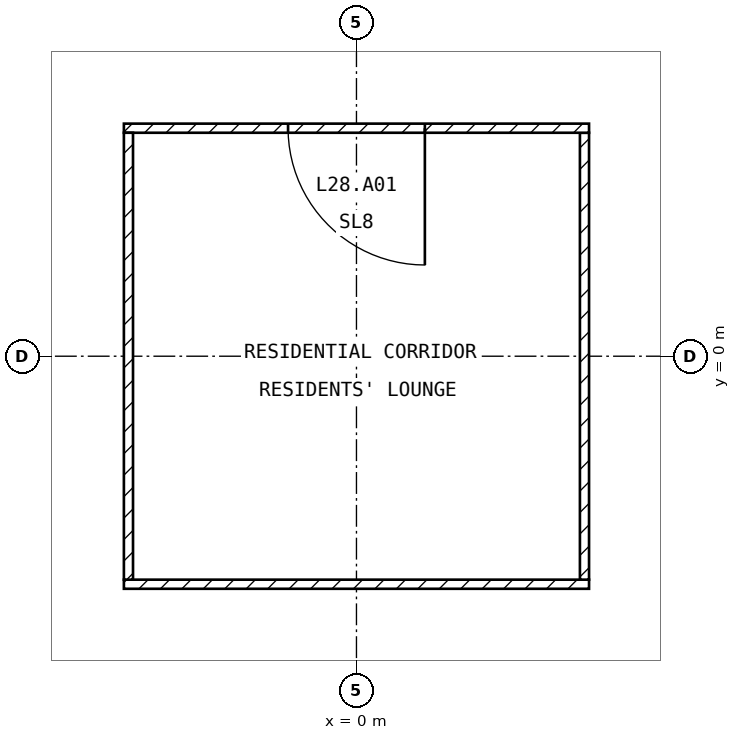
"""IFC4 building model, lengths in metres.
Left out: names, types, materials, properties, quantities, classifications, styles, units other than length and angle.
Written with IfcOpenShell. Run it as: python <this file> out.ifc"""

import sys

from ifc_helpers import new_model, si_unit, direction, frame, frame_2d, origin, place, context, subcontext, project, spatial, rectangle, extrude, element, fill, save


model = new_model("IFC4")
c1 = context("Model", 3, precision=1e-05, world=origin(), true_north=direction((0.0, 1.0)))
c2 = subcontext(c1, "Body", "Model", "MODEL_VIEW")
j1 = project(units=[si_unit("LENGTHUNIT", "METRE"), si_unit("PLANEANGLEUNIT", "RADIAN")], contexts=[c1])
p1 = place(None, origin())
s1 = spatial("IfcSite", under=j1, at=p1, CompositionType="ELEMENT")
p2 = place(p1, origin())
s2 = spatial("IfcBuilding", under=s1, at=p2, CompositionType="ELEMENT")
p3 = place(p2, frame((0.0, 0.0, 119.9)))
s3 = spatial("IfcBuildingStorey", under=s2, at=p3, CompositionType="ELEMENT", Elevation=119.9)
p4 = place(p3, frame((-3.06, -3.0, 0.0), z_axis=(0.0, 0.0, 1.0), x_axis=(1.0, 0.0, 0.0)))
e1 = element("IfcWall", 1, at=p4, inside=s3, PredefinedType="PARTITIONING", context=c2, shape_type="SweptSolid", body=[
    extrude(rectangle(XDim=6.12, YDim=0.12, at=frame_2d((3.06, 0.0))), origin(), (0.0, 0.0, 1.0), 3.25),
])
p5 = place(p3, frame((3.0, -2.94, 0.0), z_axis=(0.0, 0.0, 1.0), x_axis=(0.0, 1.0, 0.0)))
e2 = element("IfcWall", 2, at=p5, inside=s3, PredefinedType="PARTITIONING", context=c2, shape_type="SweptSolid", body=[
    extrude(rectangle(XDim=5.88, YDim=0.12, at=frame_2d((2.94, 0.0))), origin(), (0.0, 0.0, 1.0), 3.25),
])
p6 = place(p3, frame((3.06, 3.0, 0.0), z_axis=(0.0, 0.0, 1.0), x_axis=(-1.0, 0.0, 0.0)))
e3 = element("IfcWall", 3, at=p6, inside=s3, PredefinedType="PARTITIONING", context=c2, shape_type="SweptSolid", body=[
    extrude(rectangle(XDim=6.12, YDim=0.12, at=frame_2d((3.06, 0.0))), origin(), (0.0, 0.0, 1.0), 3.25),
])
p7 = place(p6, frame((2.16, 0.0, 0.0)))
e4 = element("IfcOpeningElement", 4, at=p7, cuts=e3, PredefinedType="OPENING", context=c2, shape_type="SweptSolid", body=[
    extrude(rectangle(XDim=1.8, YDim=2.1, at=frame_2d((0.9, 1.05))), frame((0.0, 0.07, 0.0), z_axis=(0.0, -1.0, 0.0), x_axis=(1.0, 0.0, 0.0)), (0.0, 0.0, 1.0), 0.14),
])
p8 = place(p3, frame((-3.0, 2.94, 0.0), z_axis=(0.0, 0.0, 1.0), x_axis=(0.0, -1.0, 0.0)))
e5 = element("IfcWall", 5, at=p8, inside=s3, PredefinedType="PARTITIONING", context=c2, shape_type="SweptSolid", body=[
    extrude(rectangle(XDim=5.88, YDim=0.12, at=frame_2d((2.94, 0.0))), origin(), (0.0, 0.0, 1.0), 3.25),
])
p9 = place(p7, origin())
e6 = element("IfcDoor", 6, at=p9, inside=s3, OperationType="SINGLE_SWING_LEFT", PredefinedType="DOOR", context=c2, shape_type="SweptSolid", body=[
    extrude(rectangle(XDim=1.8, YDim=2.1, at=frame_2d((0.9, 1.05))), frame((0.0, 0.025, 0.0), z_axis=(0.0, -1.0, 0.0), x_axis=(1.0, 0.0, 0.0)), (0.0, 0.0, 1.0), 0.05),
])
fill(e4, e6)
save(model, sys.argv[1])
